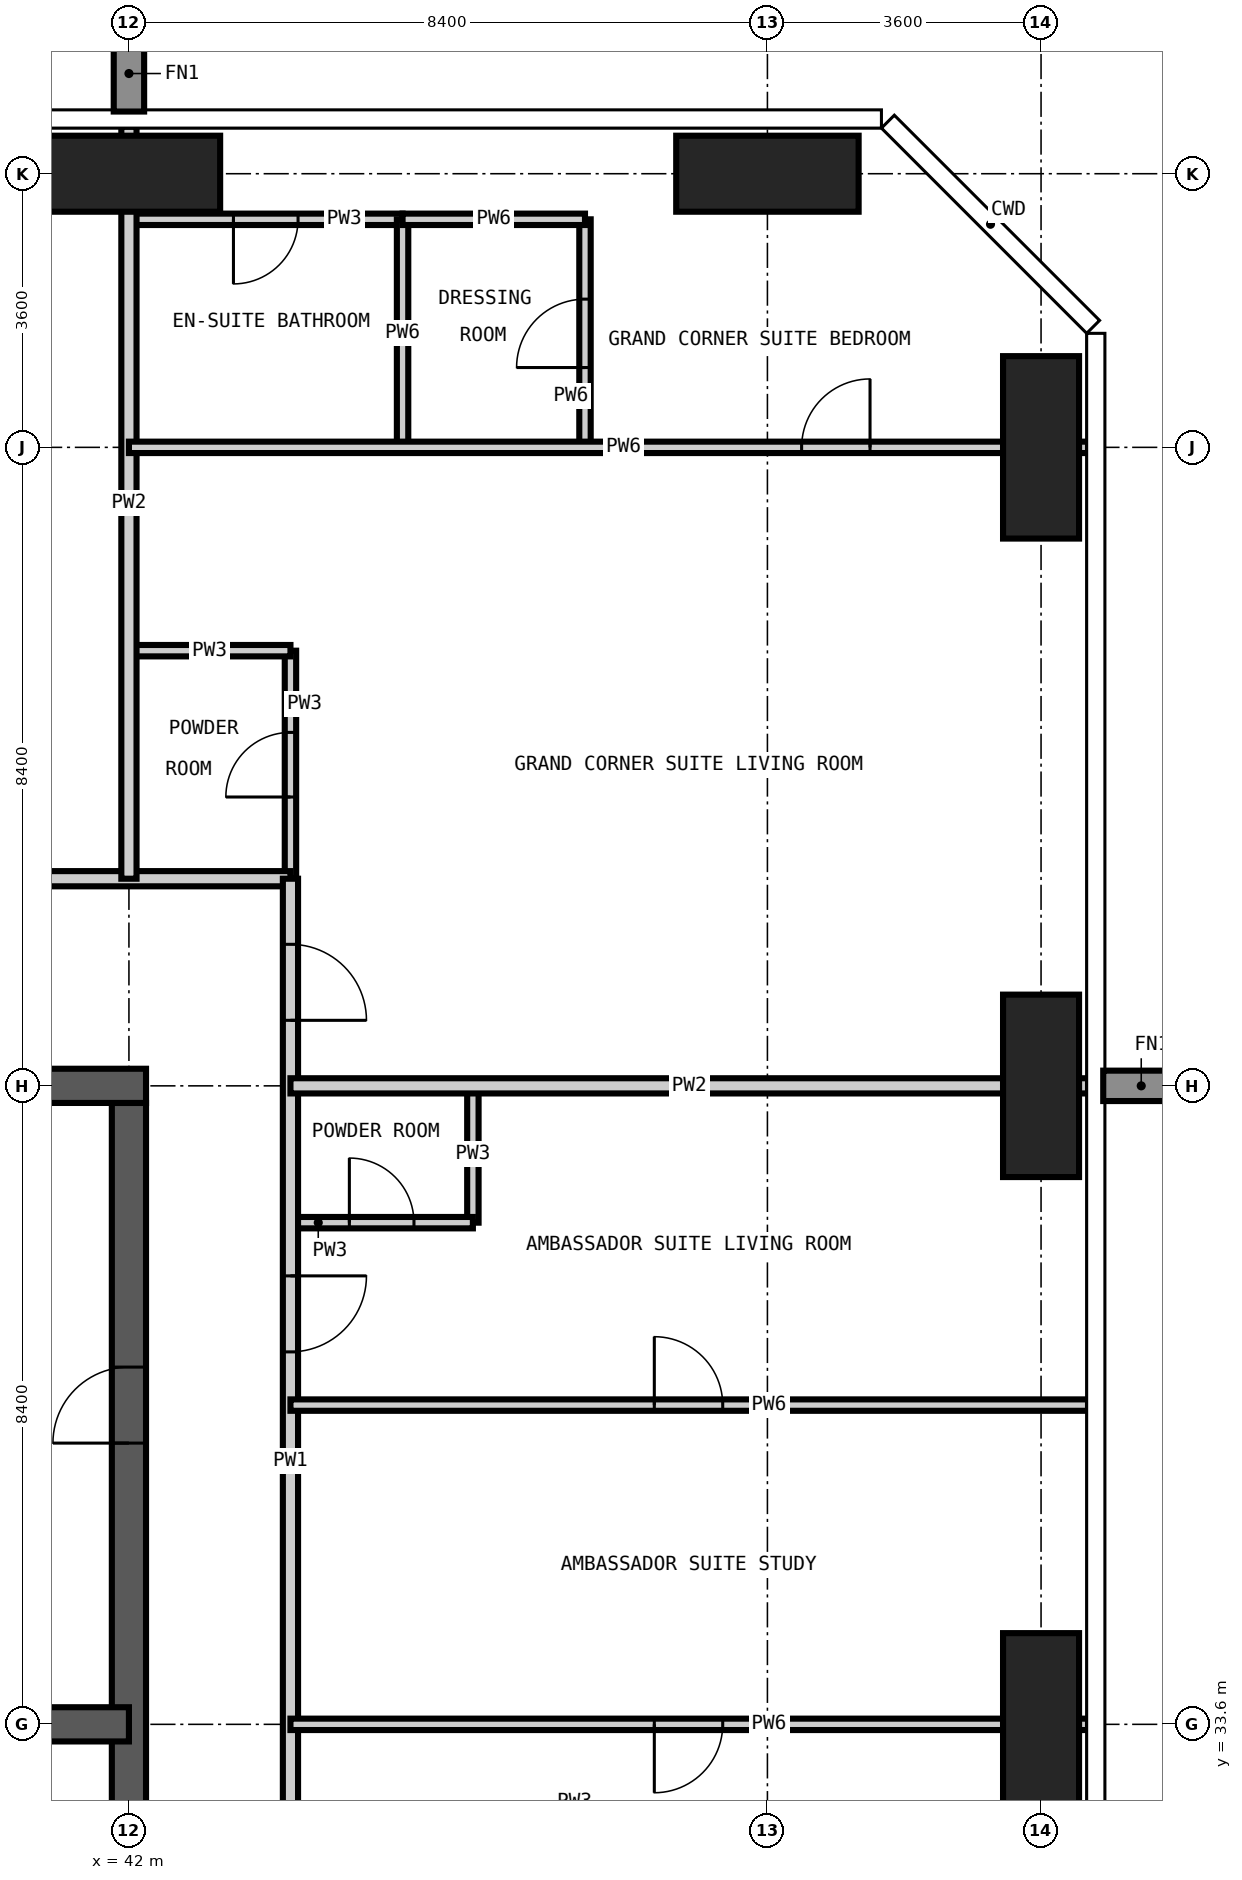
"""IFC4 building model, lengths in metres.
Left out: names, types, materials, properties, quantities, classifications, styles, units other than length and angle.
Written with IfcOpenShell. Run it as: python <this file> out.ifc"""

import sys

from ifc_helpers import new_model, si_unit, direction, frame, frame_2d, origin, origin_2d, place, context, subcontext, project, spatial, rectangle, extrude, element, fill, save


model = new_model("IFC4")
c1 = context("Model", 3, precision=1e-05, world=origin(), true_north=direction((0.0, 1.0)))
c2 = subcontext(c1, "Body", "Model", "MODEL_VIEW")
j1 = project(units=[si_unit("LENGTHUNIT", "METRE"), si_unit("PLANEANGLEUNIT", "RADIAN")], contexts=[c1])
p1 = place(None, origin())
s1 = spatial("IfcSite", under=j1, at=p1, CompositionType="ELEMENT")
p2 = place(p1, origin())
s2 = spatial("IfcBuilding", under=s1, at=p2, CompositionType="ELEMENT")
p3 = place(p2, frame((0.0, 0.0, 241.2)))
s3 = spatial("IfcBuildingStorey", under=s2, at=p3, CompositionType="ELEMENT", Elevation=241.2)
for number, where, z_axis, x_axis in (
    (1, (42.0, 54.0, -0.35), (0.0, 0.0, 1.0), (1.0, 0.0, 0.0)),
    (2, (50.4, 54.0, -0.35), (0.0, 0.0, 1.0), (1.0, 0.0, 0.0)),
):
    element("IfcColumn", number, at=place(p3, frame(where, z_axis=z_axis, x_axis=x_axis)), inside=s3, PredefinedType="COLUMN", context=c2, shape_type="SweptSolid", body=[
        extrude(rectangle(XDim=2.4, YDim=1.0, at=origin_2d()), origin(), (0.0, 0.0, 1.0), 3.9),
    ])
for number, where, z_axis, x_axis in (
    (3, (54.0, 33.6, -0.35), (0.0, 0.0, 1.0), (1.0, 0.0, 0.0)),
    (4, (54.0, 42.0, -0.35), (0.0, 0.0, 1.0), (1.0, 0.0, 0.0)),
    (5, (54.0, 50.4, -0.35), (0.0, 0.0, 1.0), (1.0, 0.0, 0.0)),
):
    element("IfcColumn", number, at=place(p3, frame(where, z_axis=z_axis, x_axis=x_axis)), inside=s3, PredefinedType="COLUMN", context=c2, shape_type="SweptSolid", body=[
        extrude(rectangle(XDim=1.0, YDim=2.4, at=origin_2d()), origin(), (0.0, 0.0, 1.0), 3.9),
    ])
p4 = place(p3, frame((42.0, 17.025, -0.35), z_axis=(0.0, 0.0, 1.0), x_axis=(0.0, 1.0, 0.0)))
e6 = element("IfcWall", 6, at=p4, inside=s3, PredefinedType="SHEAR", context=c2, shape_type="SweptSolid", body=[
    extrude(rectangle(XDim=24.75, YDim=0.45, at=frame_2d((12.375, 0.0))), origin(), (0.0, 0.0, 1.0), 3.9),
])
p5 = place(p4, frame((0.575, 0.0, 0.35)))
e7 = element("IfcOpeningElement", 7, at=p5, cuts=e6, PredefinedType="OPENING", context=c2, shape_type="SweptSolid", body=[
    extrude(rectangle(XDim=1.2, YDim=2.2, at=frame_2d((0.6, 1.1))), frame((0.0, 0.235, 0.0), z_axis=(0.0, -1.0, 0.0), x_axis=(1.0, 0.0, 0.0)), (0.0, 0.0, 1.0), 0.47),
])
p6 = place(p4, frame((11.475, 0.0, 0.35)))
e8 = element("IfcOpeningElement", 8, at=p6, cuts=e6, PredefinedType="OPENING", context=c2, shape_type="SweptSolid", body=[
    extrude(rectangle(XDim=1.8, YDim=2.2, at=frame_2d((0.9, 1.1))), frame((0.0, 0.235, 0.0), z_axis=(0.0, -1.0, 0.0), x_axis=(1.0, 0.0, 0.0)), (0.0, 0.0, 1.0), 0.47),
])
p7 = place(p4, frame((20.275, 0.0, 0.35)))
e9 = element("IfcOpeningElement", 9, at=p7, cuts=e6, PredefinedType="OPENING", context=c2, shape_type="SweptSolid", body=[
    extrude(rectangle(XDim=1.0, YDim=2.1, at=frame_2d((0.5, 1.05))), frame((0.0, 0.235, 0.0), z_axis=(0.0, -1.0, 0.0), x_axis=(1.0, 0.0, 0.0)), (0.0, 0.0, 1.0), 0.47),
])
p8 = place(p3, frame((42.225, 42.0, -0.35), z_axis=(0.0, 0.0, 1.0), x_axis=(-1.0, 0.0, 0.0)))
e10 = element("IfcWall", 10, at=p8, inside=s3, PredefinedType="SHEAR", context=c2, shape_type="SweptSolid", body=[
    extrude(rectangle(XDim=17.25, YDim=0.45, at=frame_2d((8.625, 0.0))), origin(), (0.0, 0.0, 1.0), 3.9),
])
p9 = place(p8, frame((10.125, 0.0, 0.35)))
e11 = element("IfcOpeningElement", 11, at=p9, cuts=e10, PredefinedType="OPENING", context=c2, shape_type="SweptSolid", body=[
    extrude(rectangle(XDim=1.2, YDim=2.2, at=frame_2d((0.6, 1.1))), frame((0.0, 0.235, 0.0), z_axis=(0.0, -1.0, 0.0), x_axis=(1.0, 0.0, 0.0)), (0.0, 0.0, 1.0), 0.47),
])
p10 = place(p3, frame((25.2, 33.6, -0.35), z_axis=(0.0, 0.0, 1.0), x_axis=(1.0, 0.0, 0.0)))
e12 = element("IfcWall", 12, at=p10, inside=s3, PredefinedType="SHEAR", context=c2, shape_type="SweptSolid", body=[
    extrude(rectangle(XDim=16.8, YDim=0.45, at=frame_2d((8.4, 0.0))), origin(), (0.0, 0.0, 1.0), 3.9),
])
p11 = place(p3, frame((44.125, 44.725, 0.0), z_axis=(0.0, 0.0, 1.0), x_axis=(0.0, 1.0, 0.0)))
e13 = element("IfcWall", 13, at=p11, inside=s3, PredefinedType="PARTITIONING", context=c2, shape_type="SweptSolid", body=[
    extrude(rectangle(XDim=3.0, YDim=0.15, at=frame_2d((1.5, 0.0))), origin(), (0.0, 0.0, 1.0), 3.55),
])
p12 = place(p11, frame((1.075, 0.0, 0.0)))
e14 = element("IfcOpeningElement", 14, at=p12, cuts=e13, PredefinedType="OPENING", context=c2, shape_type="SweptSolid", body=[
    extrude(rectangle(XDim=0.85, YDim=2.1, at=frame_2d((0.425, 1.05))), frame((0.0, 0.085, 0.0), z_axis=(0.0, -1.0, 0.0), x_axis=(1.0, 0.0, 0.0)), (0.0, 0.0, 1.0), 0.17),
])
p13 = place(p3, frame((46.525, 40.2, 0.0), z_axis=(0.0, 0.0, 1.0), x_axis=(0.0, 1.0, 0.0)))
e15 = element("IfcWall", 15, at=p13, inside=s3, PredefinedType="PARTITIONING", context=c2, shape_type="SweptSolid", body=[
    extrude(rectangle(XDim=1.8, YDim=0.15, at=frame_2d((0.9, 0.0))), origin(), (0.0, 0.0, 1.0), 3.55),
])
p14 = place(p3, frame((44.125, 40.2, 0.0), z_axis=(0.0, 0.0, 1.0), x_axis=(1.0, 0.0, 0.0)))
e16 = element("IfcWall", 16, at=p14, inside=s3, PredefinedType="PARTITIONING", context=c2, shape_type="SweptSolid", body=[
    extrude(rectangle(XDim=2.4, YDim=0.15, at=frame_2d((1.2, 0.0))), origin(), (0.0, 0.0, 1.0), 3.55),
])
p15 = place(p14, frame((0.775, 0.0, 0.0)))
e17 = element("IfcOpeningElement", 17, at=p15, cuts=e16, PredefinedType="OPENING", context=c2, shape_type="SweptSolid", body=[
    extrude(rectangle(XDim=0.85, YDim=2.1, at=frame_2d((0.425, 1.05))), frame((0.0, 0.085, 0.0), z_axis=(0.0, -1.0, 0.0), x_axis=(1.0, 0.0, 0.0)), (0.0, 0.0, 1.0), 0.17),
])
p16 = place(p3, frame((42.0, 47.725, 0.0), z_axis=(0.0, 0.0, 1.0), x_axis=(1.0, 0.0, 0.0)))
e18 = element("IfcWall", 18, at=p16, inside=s3, PredefinedType="PARTITIONING", context=c2, shape_type="SweptSolid", body=[
    extrude(rectangle(XDim=2.125, YDim=0.15, at=frame_2d((1.062, 0.0))), origin(), (0.0, 0.0, 1.0), 3.55),
])
p17 = place(p3, frame((42.0, 53.4, 0.0), z_axis=(0.0, 0.0, 1.0), x_axis=(1.0, 0.0, 0.0)))
e19 = element("IfcWall", 19, at=p17, inside=s3, PredefinedType="PARTITIONING", context=c2, shape_type="SweptSolid", body=[
    extrude(rectangle(XDim=3.6, YDim=0.15, at=frame_2d((1.8, 0.0))), origin(), (0.0, 0.0, 1.0), 3.55),
])
p18 = place(p17, frame((1.375, 0.0, 0.0)))
e20 = element("IfcOpeningElement", 20, at=p18, cuts=e19, PredefinedType="OPENING", context=c2, shape_type="SweptSolid", body=[
    extrude(rectangle(XDim=0.85, YDim=2.1, at=frame_2d((0.425, 1.05))), frame((0.0, 0.085, 0.0), z_axis=(0.0, -1.0, 0.0), x_axis=(1.0, 0.0, 0.0)), (0.0, 0.0, 1.0), 0.17),
])
p19 = place(p3, frame((21.875, 44.725, 0.0), z_axis=(0.0, 0.0, 1.0), x_axis=(1.0, 0.0, 0.0)))
e21 = element("IfcWall", 21, at=p19, inside=s3, PredefinedType="PARTITIONING", context=c2, shape_type="SweptSolid", body=[
    extrude(rectangle(XDim=22.25, YDim=0.2, at=frame_2d((11.125, 0.0))), origin(), (0.0, 0.0, 1.0), 3.55),
])
p20 = place(p19, frame((5.825, 0.0, 0.0)))
e22 = element("IfcOpeningElement", 22, at=p20, cuts=e21, PredefinedType="OPENING", context=c2, shape_type="SweptSolid", body=[
    extrude(rectangle(XDim=1.0, YDim=2.2, at=frame_2d((0.5, 1.1))), frame((0.0, 0.11, 0.0), z_axis=(0.0, -1.0, 0.0), x_axis=(1.0, 0.0, 0.0)), (0.0, 0.0, 1.0), 0.22),
])
p21 = place(p19, frame((17.525, 0.0, 0.0)))
e23 = element("IfcOpeningElement", 23, at=p21, cuts=e21, PredefinedType="OPENING", context=c2, shape_type="SweptSolid", body=[
    extrude(rectangle(XDim=1.0, YDim=2.1, at=frame_2d((0.5, 1.05))), frame((0.0, 0.11, 0.0), z_axis=(0.0, -1.0, 0.0), x_axis=(1.0, 0.0, 0.0)), (0.0, 0.0, 1.0), 0.22),
])
p22 = place(p3, frame((44.125, 44.725, 0.0), z_axis=(0.0, 0.0, 1.0), x_axis=(0.0, -1.0, 0.0)))
e24 = element("IfcWall", 24, at=p22, inside=s3, PredefinedType="PARTITIONING", context=c2, shape_type="SweptSolid", body=[
    extrude(rectangle(XDim=15.325, YDim=0.2, at=frame_2d((7.663, 0.0))), origin(), (0.0, 0.0, 1.0), 3.55),
])
p23 = place(p22, frame((5.225, 0.0, 0.0)))
e25 = element("IfcOpeningElement", 25, at=p23, cuts=e24, PredefinedType="OPENING", context=c2, shape_type="SweptSolid", body=[
    extrude(rectangle(XDim=1.0, YDim=2.2, at=frame_2d((0.5, 1.1))), frame((0.0, 0.11, 0.0), z_axis=(0.0, -1.0, 0.0), x_axis=(1.0, 0.0, 0.0)), (0.0, 0.0, 1.0), 0.22),
])
p24 = place(p22, frame((0.863, 0.0, 0.0)))
e26 = element("IfcOpeningElement", 26, at=p24, cuts=e24, PredefinedType="OPENING", context=c2, shape_type="SweptSolid", body=[
    extrude(rectangle(XDim=1.0, YDim=2.2, at=frame_2d((0.5, 1.1))), frame((0.0, 0.11, 0.0), z_axis=(0.0, -1.0, 0.0), x_axis=(1.0, 0.0, 0.0)), (0.0, 0.0, 1.0), 0.22),
])
p25 = place(p3, frame((42.0, 44.725, 0.0), z_axis=(0.0, 0.0, 1.0), x_axis=(0.0, 1.0, 0.0)))
e27 = element("IfcWall", 27, at=p25, inside=s3, PredefinedType="PARTITIONING", context=c2, shape_type="SweptSolid", body=[
    extrude(rectangle(XDim=9.893, YDim=0.2, at=frame_2d((4.946, 0.0))), origin(), (0.0, 0.0, 1.0), 3.55),
])
p26 = place(p3, frame((44.125, 42.0, 0.0), z_axis=(0.0, 0.0, 1.0), x_axis=(1.0, 0.0, 0.0)))
e28 = element("IfcWall", 28, at=p26, inside=s3, PredefinedType="PARTITIONING", context=c2, shape_type="SweptSolid", body=[
    extrude(rectangle(XDim=10.493, YDim=0.2, at=frame_2d((5.247, 0.0))), origin(), (0.0, 0.0, 1.0), 3.55),
])
p27 = place(p3, frame((45.6, 50.4, 0.0), z_axis=(0.0, 0.0, 1.0), x_axis=(0.0, 1.0, 0.0)))
e29 = element("IfcWall", 29, at=p27, inside=s3, PredefinedType="PARTITIONING", context=c2, shape_type="SweptSolid", body=[
    extrude(rectangle(XDim=3.0, YDim=0.15, at=frame_2d((1.5, 0.0))), origin(), (0.0, 0.0, 1.0), 3.55),
])
p28 = place(p3, frame((48.0, 50.4, 0.0), z_axis=(0.0, 0.0, 1.0), x_axis=(0.0, 1.0, 0.0)))
e30 = element("IfcWall", 30, at=p28, inside=s3, PredefinedType="PARTITIONING", context=c2, shape_type="SweptSolid", body=[
    extrude(rectangle(XDim=3.0, YDim=0.15, at=frame_2d((1.5, 0.0))), origin(), (0.0, 0.0, 1.0), 3.55),
])
p29 = place(p28, frame((1.05, 0.0, 0.0)))
e31 = element("IfcOpeningElement", 31, at=p29, cuts=e30, PredefinedType="OPENING", context=c2, shape_type="SweptSolid", body=[
    extrude(rectangle(XDim=0.9, YDim=2.1, at=frame_2d((0.45, 1.05))), frame((0.0, 0.085, 0.0), z_axis=(0.0, -1.0, 0.0), x_axis=(1.0, 0.0, 0.0)), (0.0, 0.0, 1.0), 0.17),
])
p30 = place(p3, frame((44.125, 33.6, 0.0), z_axis=(0.0, 0.0, 1.0), x_axis=(1.0, 0.0, 0.0)))
e32 = element("IfcWall", 32, at=p30, inside=s3, PredefinedType="PARTITIONING", context=c2, shape_type="SweptSolid", body=[
    extrude(rectangle(XDim=10.493, YDim=0.15, at=frame_2d((5.247, 0.0))), origin(), (0.0, 0.0, 1.0), 3.55),
])
p31 = place(p30, frame((4.787, 0.0, 0.0)))
e33 = element("IfcOpeningElement", 33, at=p31, cuts=e32, PredefinedType="OPENING", context=c2, shape_type="SweptSolid", body=[
    extrude(rectangle(XDim=0.9, YDim=2.1, at=frame_2d((0.45, 1.05))), frame((0.0, 0.085, 0.0), z_axis=(0.0, -1.0, 0.0), x_axis=(1.0, 0.0, 0.0)), (0.0, 0.0, 1.0), 0.17),
])
p32 = place(p3, frame((44.125, 37.8, 0.0), z_axis=(0.0, 0.0, 1.0), x_axis=(1.0, 0.0, 0.0)))
e34 = element("IfcWall", 34, at=p32, inside=s3, PredefinedType="PARTITIONING", context=c2, shape_type="SweptSolid", body=[
    extrude(rectangle(XDim=10.493, YDim=0.15, at=frame_2d((5.247, 0.0))), origin(), (0.0, 0.0, 1.0), 3.55),
])
p33 = place(p32, frame((4.787, 0.0, 0.0)))
e35 = element("IfcOpeningElement", 35, at=p33, cuts=e34, PredefinedType="OPENING", context=c2, shape_type="SweptSolid", body=[
    extrude(rectangle(XDim=0.9, YDim=2.1, at=frame_2d((0.45, 1.05))), frame((0.0, 0.085, 0.0), z_axis=(0.0, -1.0, 0.0), x_axis=(1.0, 0.0, 0.0)), (0.0, 0.0, 1.0), 0.17),
])
p34 = place(p3, frame((42.0, 50.4, 0.0), z_axis=(0.0, 0.0, 1.0), x_axis=(1.0, 0.0, 0.0)))
e36 = element("IfcWall", 36, at=p34, inside=s3, PredefinedType="PARTITIONING", context=c2, shape_type="SweptSolid", body=[
    extrude(rectangle(XDim=12.618, YDim=0.15, at=frame_2d((6.309, 0.0))), origin(), (0.0, 0.0, 1.0), 3.55),
])
p35 = place(p34, frame((8.85, 0.0, 0.0)))
e37 = element("IfcOpeningElement", 37, at=p35, cuts=e36, PredefinedType="OPENING", context=c2, shape_type="SweptSolid", body=[
    extrude(rectangle(XDim=0.9, YDim=2.1, at=frame_2d((0.45, 1.05))), frame((0.0, 0.085, 0.0), z_axis=(0.0, -1.0, 0.0), x_axis=(1.0, 0.0, 0.0)), (0.0, 0.0, 1.0), 0.17),
])
p36 = place(p3, frame((45.6, 53.4, 0.0), z_axis=(0.0, 0.0, 1.0), x_axis=(1.0, 0.0, 0.0)))
e38 = element("IfcWall", 38, at=p36, inside=s3, PredefinedType="PARTITIONING", context=c2, shape_type="SweptSolid", body=[
    extrude(rectangle(XDim=2.4, YDim=0.15, at=frame_2d((1.2, 0.0))), origin(), (0.0, 0.0, 1.0), 3.55),
])
p37 = place(p23, origin())
e39 = element("IfcDoor", 39, at=p37, inside=s3, OperationType="SINGLE_SWING_LEFT", PredefinedType="DOOR", context=c2, shape_type="SweptSolid", body=[
    extrude(rectangle(XDim=1.0, YDim=2.2, at=frame_2d((0.5, 1.1))), frame((0.0, 0.025, 0.0), z_axis=(0.0, -1.0, 0.0), x_axis=(1.0, 0.0, 0.0)), (0.0, 0.0, 1.0), 0.05),
])
fill(e25, e39)
p38 = place(p15, origin())
e40 = element("IfcDoor", 40, at=p38, inside=s3, OperationType="SINGLE_SWING_LEFT", PredefinedType="DOOR", context=c2, shape_type="SweptSolid", body=[
    extrude(rectangle(XDim=0.85, YDim=2.1, at=frame_2d((0.425, 1.05))), frame((0.0, 0.025, 0.0), z_axis=(0.0, -1.0, 0.0), x_axis=(1.0, 0.0, 0.0)), (0.0, 0.0, 1.0), 0.05),
])
fill(e17, e40)
p39 = place(p33, origin())
e41 = element("IfcDoor", 41, at=p39, inside=s3, OperationType="SINGLE_SWING_LEFT", PredefinedType="DOOR", context=c2, shape_type="SweptSolid", body=[
    extrude(rectangle(XDim=0.9, YDim=2.1, at=frame_2d((0.45, 1.05))), frame((0.0, 0.025, 0.0), z_axis=(0.0, -1.0, 0.0), x_axis=(1.0, 0.0, 0.0)), (0.0, 0.0, 1.0), 0.05),
])
fill(e35, e41)
p40 = place(p31, frame((0.9, 0.0, 0.0), z_axis=(0.0, 0.0, 1.0), x_axis=(-1.0, 0.0, 0.0)))
e42 = element("IfcDoor", 42, at=p40, inside=s3, OperationType="SINGLE_SWING_RIGHT", PredefinedType="DOOR", context=c2, shape_type="SweptSolid", body=[
    extrude(rectangle(XDim=0.9, YDim=2.1, at=frame_2d((0.45, 1.05))), frame((0.0, 0.025, 0.0), z_axis=(0.0, -1.0, 0.0), x_axis=(1.0, 0.0, 0.0)), (0.0, 0.0, 1.0), 0.05),
])
fill(e33, e42)
p41 = place(p24, origin())
e43 = element("IfcDoor", 43, at=p41, inside=s3, OperationType="SINGLE_SWING_RIGHT", PredefinedType="DOOR", context=c2, shape_type="SweptSolid", body=[
    extrude(rectangle(XDim=1.0, YDim=2.2, at=frame_2d((0.5, 1.1))), frame((0.0, 0.025, 0.0), z_axis=(0.0, -1.0, 0.0), x_axis=(1.0, 0.0, 0.0)), (0.0, 0.0, 1.0), 0.05),
])
fill(e26, e43)
p42 = place(p12, origin())
e44 = element("IfcDoor", 44, at=p42, inside=s3, OperationType="SINGLE_SWING_LEFT", PredefinedType="DOOR", context=c2, shape_type="SweptSolid", body=[
    extrude(rectangle(XDim=0.85, YDim=2.1, at=frame_2d((0.425, 1.05))), frame((0.0, 0.025, 0.0), z_axis=(0.0, -1.0, 0.0), x_axis=(1.0, 0.0, 0.0)), (0.0, 0.0, 1.0), 0.05),
])
fill(e14, e44)
p43 = place(p35, origin())
e45 = element("IfcDoor", 45, at=p43, inside=s3, OperationType="SINGLE_SWING_RIGHT", PredefinedType="DOOR", context=c2, shape_type="SweptSolid", body=[
    extrude(rectangle(XDim=0.9, YDim=2.1, at=frame_2d((0.45, 1.05))), frame((0.0, 0.025, 0.0), z_axis=(0.0, -1.0, 0.0), x_axis=(1.0, 0.0, 0.0)), (0.0, 0.0, 1.0), 0.05),
])
fill(e37, e45)
p44 = place(p18, frame((0.85, 0.0, 0.0), z_axis=(0.0, 0.0, 1.0), x_axis=(-1.0, 0.0, 0.0)))
e46 = element("IfcDoor", 46, at=p44, inside=s3, OperationType="SINGLE_SWING_RIGHT", PredefinedType="DOOR", context=c2, shape_type="SweptSolid", body=[
    extrude(rectangle(XDim=0.85, YDim=2.1, at=frame_2d((0.425, 1.05))), frame((0.0, 0.025, 0.0), z_axis=(0.0, -1.0, 0.0), x_axis=(1.0, 0.0, 0.0)), (0.0, 0.0, 1.0), 0.05),
])
fill(e20, e46)
p45 = place(p29, origin())
e47 = element("IfcDoor", 47, at=p45, inside=s3, OperationType="SINGLE_SWING_LEFT", PredefinedType="DOOR", context=c2, shape_type="SweptSolid", body=[
    extrude(rectangle(XDim=0.9, YDim=2.1, at=frame_2d((0.45, 1.05))), frame((0.0, 0.025, 0.0), z_axis=(0.0, -1.0, 0.0), x_axis=(1.0, 0.0, 0.0)), (0.0, 0.0, 1.0), 0.05),
])
fill(e31, e47)
p46 = place(p7, origin())
e48 = element("IfcDoor", 48, at=p46, inside=s3, OperationType="SINGLE_SWING_LEFT", PredefinedType="DOOR", context=c2, shape_type="SweptSolid", body=[
    extrude(rectangle(XDim=1.0, YDim=2.1, at=frame_2d((0.5, 1.05))), frame((0.0, 0.025, 0.0), z_axis=(0.0, -1.0, 0.0), x_axis=(1.0, 0.0, 0.0)), (0.0, 0.0, 1.0), 0.05),
])
fill(e9, e48)
save(model, sys.argv[1])
